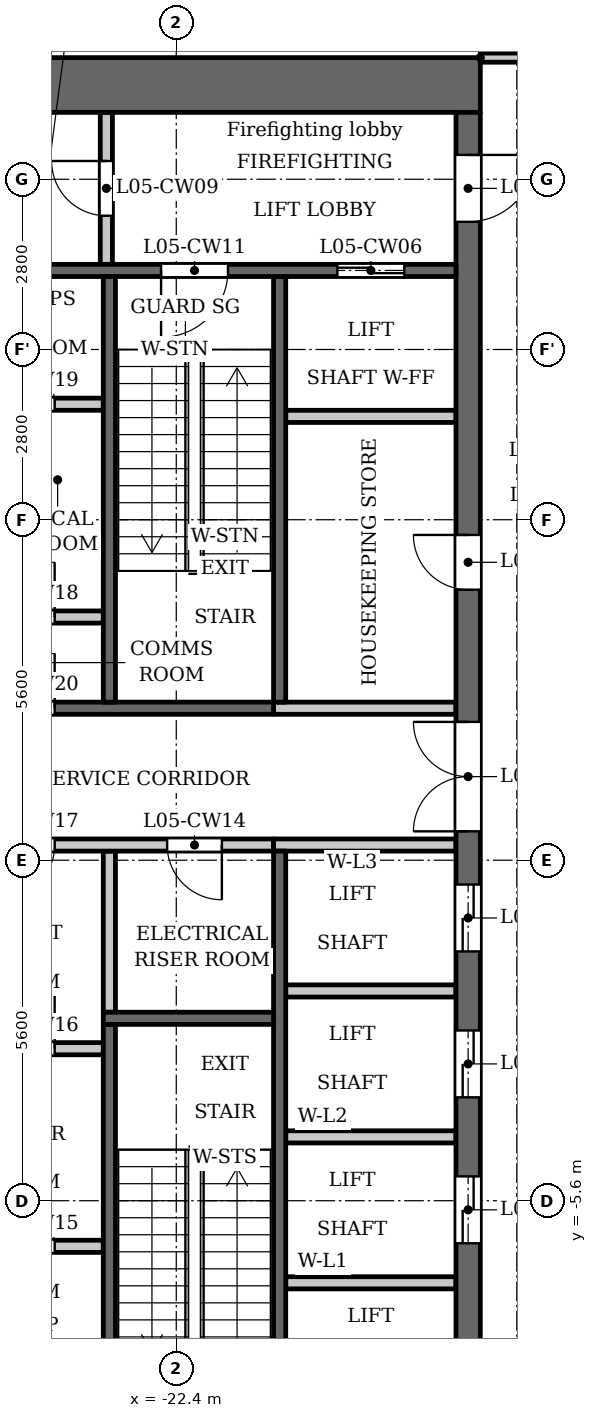
"""IFC4 building model, lengths in metres.
Left out: names, types, materials, properties, quantities, classifications, styles, units other than length and angle.
Written with IfcOpenShell. Run it as: python <this file> out.ifc"""

import sys

from ifc_helpers import new_model, si_unit, direction, frame, frame_2d, origin, place, context, subcontext, project, spatial, rectangle, extrude, element, fill, save


model = new_model("IFC4")
c1 = context("Model", 3, precision=1e-05, world=origin(), true_north=direction((0.0, 1.0)))
c2 = subcontext(c1, "Body", "Model", "MODEL_VIEW")
j1 = project(units=[si_unit("LENGTHUNIT", "METRE"), si_unit("PLANEANGLEUNIT", "RADIAN")], contexts=[c1])
p1 = place(None, origin())
s1 = spatial("IfcSite", under=j1, at=p1, CompositionType="ELEMENT")
p2 = place(p1, origin())
s2 = spatial("IfcBuilding", under=s1, at=p2, CompositionType="ELEMENT")
p3 = place(p2, frame((0.0, 0.0, 25.7)))
s3 = spatial("IfcBuildingStorey", under=s2, at=p3, CompositionType="ELEMENT", Elevation=25.7)
p4 = place(p3, frame((-23.5, -2.5, 0.0), z_axis=(0.0, 0.0, 1.0), x_axis=(0.0, 1.0, 0.0)))
e1 = element("IfcWall", 1, at=p4, inside=s3, PredefinedType="PARTITIONING", context=c2, shape_type="SweptSolid", body=[
    extrude(rectangle(XDim=2.65, YDim=0.2, at=frame_2d((1.325, 0.0))), origin(), (0.0, 0.0, 1.0), 4.45),
])
p5 = place(p3, frame((-20.7, 2.6, 0.0), z_axis=(0.0, 0.0, 1.0), x_axis=(0.0, 1.0, 0.0)))
e2 = element("IfcWall", 2, at=p5, inside=s3, PredefinedType="SHEAR", context=c2, shape_type="SweptSolid", body=[
    extrude(rectangle(XDim=7.0, YDim=0.2, at=frame_2d((3.5, 0.0))), origin(), (0.0, 0.0, 1.0), 4.45),
])
p6 = place(p3, frame((-20.7, -9.6, 0.0), z_axis=(0.0, 0.0, 1.0), x_axis=(0.0, 1.0, 0.0)))
e3 = element("IfcWall", 3, at=p6, inside=s3, PredefinedType="SHEAR", context=c2, shape_type="SweptSolid", body=[
    extrude(rectangle(XDim=9.75, YDim=0.2, at=frame_2d((4.875, 0.0))), origin(), (0.0, 0.0, 1.0), 4.45),
])
p7 = place(p3, frame((-20.8, 2.5, 0.0), z_axis=(0.0, 0.0, 1.0), x_axis=(-1.0, 0.0, 0.0)))
e4 = element("IfcWall", 4, at=p7, inside=s3, PredefinedType="SHEAR", context=c2, shape_type="SweptSolid", body=[
    extrude(rectangle(XDim=5.3, YDim=0.2, at=frame_2d((2.65, 0.0))), origin(), (0.0, 0.0, 1.0), 4.45),
])
p8 = place(p7, frame((3.6, 0.0, 0.0)))
e5 = element("IfcOpeningElement", 5, at=p8, cuts=e4, PredefinedType="OPENING", context=c2, shape_type="SweptSolid", body=[
    extrude(rectangle(XDim=0.9, YDim=2.1, at=frame_2d((0.45, 1.05))), frame((0.0, 0.11, 0.0), z_axis=(0.0, -1.0, 0.0), x_axis=(1.0, 0.0, 0.0)), (0.0, 0.0, 1.0), 0.22),
])
p9 = place(p3, frame((-20.8, 0.25, 0.0), z_axis=(0.0, 0.0, 1.0), x_axis=(-1.0, 0.0, 0.0)))
e6 = element("IfcWall", 6, at=p9, inside=s3, PredefinedType="PARTITIONING", context=c2, shape_type="SweptSolid", body=[
    extrude(rectangle(XDim=5.3, YDim=0.2, at=frame_2d((2.65, 0.0))), origin(), (0.0, 0.0, 1.0), 4.45),
])
p10 = place(p9, frame((0.85, 0.0, 0.0)))
e7 = element("IfcOpeningElement", 7, at=p10, cuts=e6, PredefinedType="OPENING", context=c2, shape_type="SweptSolid", body=[
    extrude(rectangle(XDim=0.9, YDim=2.1, at=frame_2d((0.45, 1.05))), frame((0.0, 0.11, 0.0), z_axis=(0.0, -1.0, 0.0), x_axis=(1.0, 0.0, 0.0)), (0.0, 0.0, 1.0), 0.22),
])
p11 = place(p9, frame((3.6, 0.0, 0.0)))
e8 = element("IfcOpeningElement", 8, at=p11, cuts=e6, PredefinedType="OPENING", context=c2, shape_type="SweptSolid", body=[
    extrude(rectangle(XDim=0.9, YDim=2.1, at=frame_2d((0.45, 1.05))), frame((0.0, 0.11, 0.0), z_axis=(0.0, -1.0, 0.0), x_axis=(1.0, 0.0, 0.0)), (0.0, 0.0, 1.0), 0.22),
])
p12 = place(p3, frame((-17.4, 12.75, 0.0), z_axis=(0.0, 0.0, 1.0), x_axis=(-1.0, 0.0, 0.0)))
e9 = element("IfcWall", 9, at=p12, inside=s3, PredefinedType="SHEAR", context=c2, shape_type="SweptSolid", body=[
    extrude(rectangle(XDim=10.4, YDim=0.9, at=frame_2d((5.2, 0.0))), origin(), (0.0, 0.0, 1.0), 4.45),
])
p13 = place(p3, frame((-17.6, -12.3, 0.0), z_axis=(0.0, 0.0, 1.0), x_axis=(0.0, 1.0, 0.0)))
e10 = element("IfcWall", 10, at=p13, inside=s3, PredefinedType="SHEAR", context=c2, shape_type="SweptSolid", body=[
    extrude(rectangle(XDim=24.6, YDim=0.4, at=frame_2d((12.3, 0.0))), origin(), (0.0, 0.0, 1.0), 4.45),
])
p14 = place(p13, frame((6.0, 0.0, 0.0)))
e11 = element("IfcOpeningElement", 11, at=p14, cuts=e10, PredefinedType="OPENING", context=c2, shape_type="SweptSolid", body=[
    extrude(rectangle(XDim=1.1, YDim=2.1, at=frame_2d((0.55, 1.05))), frame((0.0, 0.21, 0.0), z_axis=(0.0, -1.0, 0.0), x_axis=(1.0, 0.0, 0.0)), (0.0, 0.0, 1.0), 0.42),
])
p15 = place(p13, frame((8.4, 0.0, 0.0)))
e12 = element("IfcOpeningElement", 12, at=p15, cuts=e10, PredefinedType="OPENING", context=c2, shape_type="SweptSolid", body=[
    extrude(rectangle(XDim=1.1, YDim=2.1, at=frame_2d((0.55, 1.05))), frame((0.0, 0.21, 0.0), z_axis=(0.0, -1.0, 0.0), x_axis=(1.0, 0.0, 0.0)), (0.0, 0.0, 1.0), 0.42),
])
p16 = place(p13, frame((10.8, 0.0, 0.0)))
e13 = element("IfcOpeningElement", 13, at=p16, cuts=e10, PredefinedType="OPENING", context=c2, shape_type="SweptSolid", body=[
    extrude(rectangle(XDim=1.1, YDim=2.1, at=frame_2d((0.55, 1.05))), frame((0.0, 0.21, 0.0), z_axis=(0.0, -1.0, 0.0), x_axis=(1.0, 0.0, 0.0)), (0.0, 0.0, 1.0), 0.42),
])
p17 = place(p13, frame((16.75, 0.0, 0.0)))
e14 = element("IfcOpeningElement", 14, at=p17, cuts=e10, PredefinedType="OPENING", context=c2, shape_type="SweptSolid", body=[
    extrude(rectangle(XDim=0.9, YDim=2.1, at=frame_2d((0.45, 1.05))), frame((0.0, 0.21, 0.0), z_axis=(0.0, -1.0, 0.0), x_axis=(1.0, 0.0, 0.0)), (0.0, 0.0, 1.0), 0.42),
])
p18 = place(p13, frame((22.8, 0.0, 0.0)))
e15 = element("IfcOpeningElement", 15, at=p18, cuts=e10, PredefinedType="OPENING", context=c2, shape_type="SweptSolid", body=[
    extrude(rectangle(XDim=1.1, YDim=2.1, at=frame_2d((0.55, 1.05))), frame((0.0, 0.21, 0.0), z_axis=(0.0, -1.0, 0.0), x_axis=(1.0, 0.0, 0.0)), (0.0, 0.0, 1.0), 0.42),
])
p19 = place(p13, frame((0.7, 0.0, 0.0)))
e16 = element("IfcOpeningElement", 16, at=p19, cuts=e10, PredefinedType="OPENING", context=c2, shape_type="SweptSolid", body=[
    extrude(rectangle(XDim=1.1, YDim=2.1, at=frame_2d((0.55, 1.05))), frame((0.0, 0.21, 0.0), z_axis=(0.0, -1.0, 0.0), x_axis=(1.0, 0.0, 0.0)), (0.0, 0.0, 1.0), 0.42),
])
p20 = place(p13, frame((12.775, 0.0, 0.0)))
e17 = element("IfcOpeningElement", 17, at=p20, cuts=e10, PredefinedType="OPENING", context=c2, shape_type="SweptSolid", body=[
    extrude(rectangle(XDim=1.8, YDim=2.1, at=frame_2d((0.9, 1.05))), frame((0.0, 0.21, 0.0), z_axis=(0.0, -1.0, 0.0), x_axis=(1.0, 0.0, 0.0)), (0.0, 0.0, 1.0), 0.42),
])
p21 = place(p3, frame((-23.55, 9.8, 0.0), z_axis=(0.0, 0.0, 1.0), x_axis=(0.0, 1.0, 0.0)))
e18 = element("IfcWall", 18, at=p21, inside=s3, PredefinedType="PARTITIONING", context=c2, shape_type="SweptSolid", body=[
    extrude(rectangle(XDim=2.5, YDim=0.2, at=frame_2d((1.25, 0.0))), origin(), (0.0, 0.0, 1.0), 4.45),
])
p22 = place(p21, frame((0.8, 0.0, 0.0)))
e19 = element("IfcOpeningElement", 19, at=p22, cuts=e18, PredefinedType="OPENING", context=c2, shape_type="SweptSolid", body=[
    extrude(rectangle(XDim=0.9, YDim=2.1, at=frame_2d((0.45, 1.05))), frame((0.0, 0.11, 0.0), z_axis=(0.0, -1.0, 0.0), x_axis=(1.0, 0.0, 0.0)), (0.0, 0.0, 1.0), 0.22),
])
p23 = place(p3, frame((-23.6, -6.35, 0.0), z_axis=(0.0, 0.0, 1.0), x_axis=(-1.0, 0.0, 0.0)))
e20 = element("IfcWall", 20, at=p23, inside=s3, PredefinedType="PARTITIONING", context=c2, shape_type="SweptSolid", body=[
    extrude(rectangle(XDim=2.5, YDim=0.2, at=frame_2d((1.25, 0.0))), origin(), (0.0, 0.0, 1.0), 4.45),
])
p24 = place(p23, frame((0.8, 0.0, 0.0)))
e21 = element("IfcOpeningElement", 21, at=p24, cuts=e20, PredefinedType="OPENING", context=c2, shape_type="SweptSolid", body=[
    extrude(rectangle(XDim=0.9, YDim=2.1, at=frame_2d((0.45, 1.05))), frame((0.0, 0.11, 0.0), z_axis=(0.0, -1.0, 0.0), x_axis=(1.0, 0.0, 0.0)), (0.0, 0.0, 1.0), 0.22),
])
p25 = place(p3, frame((-23.6, -3.1, 0.0), z_axis=(0.0, 0.0, 1.0), x_axis=(-1.0, 0.0, 0.0)))
e22 = element("IfcWall", 22, at=p25, inside=s3, PredefinedType="PARTITIONING", context=c2, shape_type="SweptSolid", body=[
    extrude(rectangle(XDim=2.5, YDim=0.2, at=frame_2d((1.25, 0.0))), origin(), (0.0, 0.0, 1.0), 4.45),
])
p26 = place(p25, frame((0.8, 0.0, 0.0)))
e23 = element("IfcOpeningElement", 23, at=p26, cuts=e22, PredefinedType="OPENING", context=c2, shape_type="SweptSolid", body=[
    extrude(rectangle(XDim=0.9, YDim=2.1, at=frame_2d((0.45, 1.05))), frame((0.0, 0.11, 0.0), z_axis=(0.0, -1.0, 0.0), x_axis=(1.0, 0.0, 0.0)), (0.0, 0.0, 1.0), 0.22),
])
p27 = place(p3, frame((-23.6, 4.0, 0.0), z_axis=(0.0, 0.0, 1.0), x_axis=(-1.0, 0.0, 0.0)))
e24 = element("IfcWall", 24, at=p27, inside=s3, PredefinedType="PARTITIONING", context=c2, shape_type="SweptSolid", body=[
    extrude(rectangle(XDim=2.5, YDim=0.2, at=frame_2d((1.25, 0.0))), origin(), (0.0, 0.0, 1.0), 4.45),
])
p28 = place(p27, frame((0.8, 0.0, 0.0)))
e25 = element("IfcOpeningElement", 25, at=p28, cuts=e24, PredefinedType="OPENING", context=c2, shape_type="SweptSolid", body=[
    extrude(rectangle(XDim=0.9, YDim=2.1, at=frame_2d((0.45, 1.05))), frame((0.0, 0.11, 0.0), z_axis=(0.0, -1.0, 0.0), x_axis=(1.0, 0.0, 0.0)), (0.0, 0.0, 1.0), 0.22),
])
p29 = place(p3, frame((-23.6, 7.5, 0.0), z_axis=(0.0, 0.0, 1.0), x_axis=(-1.0, 0.0, 0.0)))
e26 = element("IfcWall", 26, at=p29, inside=s3, PredefinedType="PARTITIONING", context=c2, shape_type="SweptSolid", body=[
    extrude(rectangle(XDim=2.5, YDim=0.2, at=frame_2d((1.25, 0.0))), origin(), (0.0, 0.0, 1.0), 4.45),
])
p30 = place(p29, frame((0.8, 0.0, 0.0)))
e27 = element("IfcOpeningElement", 27, at=p30, cuts=e26, PredefinedType="OPENING", context=c2, shape_type="SweptSolid", body=[
    extrude(rectangle(XDim=0.9, YDim=2.1, at=frame_2d((0.45, 1.05))), frame((0.0, 0.11, 0.0), z_axis=(0.0, -1.0, 0.0), x_axis=(1.0, 0.0, 0.0)), (0.0, 0.0, 1.0), 0.22),
])
for number, where, z_axis, x_axis in (
    (28, (-17.8, -6.95, 0.0), (0.0, 0.0, 1.0), (-1.0, 0.0, 0.0)),
    (29, (-17.8, -4.55, 0.0), (0.0, 0.0, 1.0), (-1.0, 0.0, 0.0)),
    (30, (-17.8, -2.15, 0.0), (0.0, 0.0, 1.0), (-1.0, 0.0, 0.0)),
):
    element("IfcWall", number, at=place(p3, frame(where, z_axis=z_axis, x_axis=x_axis)), inside=s3, PredefinedType="PARTITIONING", context=c2, shape_type="SweptSolid", body=[
        extrude(rectangle(XDim=2.8, YDim=0.2, at=frame_2d((1.4, 0.0))), origin(), (0.0, 0.0, 1.0), 4.45),
    ])
for number, where, z_axis, x_axis in (
    (31, (-17.8, 0.25, 0.0), (0.0, 0.0, 1.0), (-1.0, 0.0, 0.0)),
    (32, (-17.8, 2.5, 0.0), (0.0, 0.0, 1.0), (-1.0, 0.0, 0.0)),
):
    element("IfcWall", number, at=place(p3, frame(where, z_axis=z_axis, x_axis=x_axis)), inside=s3, PredefinedType="PARTITIONING", context=c2, shape_type="SweptSolid", body=[
        extrude(rectangle(XDim=3.0, YDim=0.2, at=frame_2d((1.5, 0.0))), origin(), (0.0, 0.0, 1.0), 4.45),
    ])
p31 = place(p3, frame((-17.8, 7.3, 0.0), z_axis=(0.0, 0.0, 1.0), x_axis=(-1.0, 0.0, 0.0)))
e33 = element("IfcWall", 33, at=p31, inside=s3, PredefinedType="PARTITIONING", context=c2, shape_type="SweptSolid", body=[
    extrude(rectangle(XDim=2.8, YDim=0.2, at=frame_2d((1.4, 0.0))), origin(), (0.0, 0.0, 1.0), 4.45),
])
p32 = place(p3, frame((-17.8, 9.7, 0.0), z_axis=(0.0, 0.0, 1.0), x_axis=(-1.0, 0.0, 0.0)))
e34 = element("IfcWall", 34, at=p32, inside=s3, PredefinedType="SHEAR", context=c2, shape_type="SweptSolid", body=[
    extrude(rectangle(XDim=8.3, YDim=0.2, at=frame_2d((4.15, 0.0))), origin(), (0.0, 0.0, 1.0), 4.45),
])
p33 = place(p32, frame((0.85, 0.0, 0.0)))
e35 = element("IfcOpeningElement", 35, at=p33, cuts=e34, PredefinedType="OPENING", context=c2, shape_type="SweptSolid", body=[
    extrude(rectangle(XDim=1.1, YDim=2.1, at=frame_2d((0.55, 1.05))), frame((0.0, 0.11, 0.0), z_axis=(0.0, -1.0, 0.0), x_axis=(1.0, 0.0, 0.0)), (0.0, 0.0, 1.0), 0.22),
])
p34 = place(p32, frame((3.75, 0.0, 0.0)))
e36 = element("IfcOpeningElement", 36, at=p34, cuts=e34, PredefinedType="OPENING", context=c2, shape_type="SweptSolid", body=[
    extrude(rectangle(XDim=1.1, YDim=2.1, at=frame_2d((0.55, 1.05))), frame((0.0, 0.11, 0.0), z_axis=(0.0, -1.0, 0.0), x_axis=(1.0, 0.0, 0.0)), (0.0, 0.0, 1.0), 0.22),
])
p35 = place(p3, frame((-23.5, 2.6, 0.0), z_axis=(0.0, 0.0, 1.0), x_axis=(0.0, 1.0, 0.0)))
e37 = element("IfcWall", 37, at=p35, inside=s3, PredefinedType="SHEAR", context=c2, shape_type="SweptSolid", body=[
    extrude(rectangle(XDim=7.0, YDim=0.2, at=frame_2d((3.5, 0.0))), origin(), (0.0, 0.0, 1.0), 4.45),
])
p36 = place(p3, frame((-23.5, -9.6, 0.0), z_axis=(0.0, 0.0, 1.0), x_axis=(0.0, 1.0, 0.0)))
e38 = element("IfcWall", 38, at=p36, inside=s3, PredefinedType="SHEAR", context=c2, shape_type="SweptSolid", body=[
    extrude(rectangle(XDim=6.9, YDim=0.2, at=frame_2d((3.45, 0.0))), origin(), (0.0, 0.0, 1.0), 4.45),
])
p37 = place(p3, frame((-20.8, -2.6, 0.0), z_axis=(0.0, 0.0, 1.0), x_axis=(-1.0, 0.0, 0.0)))
e39 = element("IfcWall", 39, at=p37, inside=s3, PredefinedType="SHEAR", context=c2, shape_type="SweptSolid", body=[
    extrude(rectangle(XDim=2.8, YDim=0.2, at=frame_2d((1.4, 0.0))), origin(), (0.0, 0.0, 1.0), 4.45),
])
p38 = place(p3, frame((-17.4, 13.2, 0.0), z_axis=(0.0, 0.0, 1.0), x_axis=(1.0, 0.0, 0.0)))
e40 = element("IfcWall", 40, at=p38, inside=s3, PredefinedType="PARTITIONING", context=c2, shape_type="SweptSolid", body=[
    extrude(rectangle(XDim=34.8, YDim=0.15, at=frame_2d((17.4, 0.0))), origin(), (0.0, 0.0, 1.0), 4.45),
])
p39 = place(p38, frame((3.05, 0.0, 0.0)))
e41 = element("IfcOpeningElement", 41, at=p39, cuts=e40, PredefinedType="OPENING", context=c2, shape_type="SweptSolid", body=[
    extrude(rectangle(XDim=1.8, YDim=2.1, at=frame_2d((0.9, 1.05))), frame((0.0, 0.085, 0.0), z_axis=(0.0, -1.0, 0.0), x_axis=(1.0, 0.0, 0.0)), (0.0, 0.0, 1.0), 0.17),
])
p40 = place(p38, frame((0.75, 0.0, 0.0)))
e42 = element("IfcOpeningElement", 42, at=p40, cuts=e40, PredefinedType="OPENING", context=c2, shape_type="SweptSolid", body=[
    extrude(rectangle(XDim=1.0, YDim=2.1, at=frame_2d((0.5, 1.05))), frame((0.0, 0.085, 0.0), z_axis=(0.0, -1.0, 0.0), x_axis=(1.0, 0.0, 0.0)), (0.0, 0.0, 1.0), 0.17),
])
p41 = place(p38, frame((33.15, 0.0, 0.0)))
e43 = element("IfcOpeningElement", 43, at=p41, cuts=e40, PredefinedType="OPENING", context=c2, shape_type="SweptSolid", body=[
    extrude(rectangle(XDim=1.0, YDim=2.1, at=frame_2d((0.5, 1.05))), frame((0.0, 0.085, 0.0), z_axis=(0.0, -1.0, 0.0), x_axis=(1.0, 0.0, 0.0)), (0.0, 0.0, 1.0), 0.17),
])
p42 = place(p14, origin())
e44 = element("IfcDoor", 44, at=p42, inside=s3, OperationType="DOUBLE_DOOR_SLIDING", PredefinedType="DOOR", context=c2, shape_type="SweptSolid", body=[
    extrude(rectangle(XDim=1.1, YDim=2.1, at=frame_2d((0.55, 1.05))), frame((0.0, 0.025, 0.0), z_axis=(0.0, -1.0, 0.0), x_axis=(1.0, 0.0, 0.0)), (0.0, 0.0, 1.0), 0.05),
])
fill(e11, e44)
p43 = place(p15, origin())
e45 = element("IfcDoor", 45, at=p43, inside=s3, OperationType="DOUBLE_DOOR_SLIDING", PredefinedType="DOOR", context=c2, shape_type="SweptSolid", body=[
    extrude(rectangle(XDim=1.1, YDim=2.1, at=frame_2d((0.55, 1.05))), frame((0.0, 0.025, 0.0), z_axis=(0.0, -1.0, 0.0), x_axis=(1.0, 0.0, 0.0)), (0.0, 0.0, 1.0), 0.05),
])
fill(e12, e45)
p44 = place(p16, origin())
e46 = element("IfcDoor", 46, at=p44, inside=s3, OperationType="DOUBLE_DOOR_SLIDING", PredefinedType="DOOR", context=c2, shape_type="SweptSolid", body=[
    extrude(rectangle(XDim=1.1, YDim=2.1, at=frame_2d((0.55, 1.05))), frame((0.0, 0.025, 0.0), z_axis=(0.0, -1.0, 0.0), x_axis=(1.0, 0.0, 0.0)), (0.0, 0.0, 1.0), 0.05),
])
fill(e13, e46)
p45 = place(p17, origin())
e47 = element("IfcDoor", 47, at=p45, inside=s3, OperationType="SINGLE_SWING_LEFT", PredefinedType="DOOR", context=c2, shape_type="SweptSolid", body=[
    extrude(rectangle(XDim=0.9, YDim=2.1, at=frame_2d((0.45, 1.05))), frame((0.0, 0.025, 0.0), z_axis=(0.0, -1.0, 0.0), x_axis=(1.0, 0.0, 0.0)), (0.0, 0.0, 1.0), 0.05),
])
fill(e14, e47)
p46 = place(p33, origin())
e48 = element("IfcDoor", 48, at=p46, inside=s3, OperationType="DOUBLE_DOOR_SLIDING", PredefinedType="DOOR", context=c2, shape_type="SweptSolid", body=[
    extrude(rectangle(XDim=1.1, YDim=2.1, at=frame_2d((0.55, 1.05))), frame((0.0, 0.025, 0.0), z_axis=(0.0, -1.0, 0.0), x_axis=(1.0, 0.0, 0.0)), (0.0, 0.0, 1.0), 0.05),
])
fill(e35, e48)
p47 = place(p18, origin())
e49 = element("IfcDoor", 49, at=p47, inside=s3, OperationType="SINGLE_SWING_RIGHT", PredefinedType="DOOR", context=c2, shape_type="SweptSolid", body=[
    extrude(rectangle(XDim=1.1, YDim=2.1, at=frame_2d((0.55, 1.05))), frame((0.0, 0.025, 0.0), z_axis=(0.0, -1.0, 0.0), x_axis=(1.0, 0.0, 0.0)), (0.0, 0.0, 1.0), 0.05),
])
fill(e15, e49)
p48 = place(p22, origin())
e50 = element("IfcDoor", 50, at=p48, inside=s3, OperationType="SINGLE_SWING_LEFT", PredefinedType="DOOR", context=c2, shape_type="SweptSolid", body=[
    extrude(rectangle(XDim=0.9, YDim=2.1, at=frame_2d((0.45, 1.05))), frame((0.0, 0.025, 0.0), z_axis=(0.0, -1.0, 0.0), x_axis=(1.0, 0.0, 0.0)), (0.0, 0.0, 1.0), 0.05),
])
fill(e19, e50)
p49 = place(p34, origin())
e51 = element("IfcDoor", 51, at=p49, inside=s3, OperationType="SINGLE_SWING_LEFT", PredefinedType="DOOR", context=c2, shape_type="SweptSolid", body=[
    extrude(rectangle(XDim=1.1, YDim=2.1, at=frame_2d((0.55, 1.05))), frame((0.0, 0.025, 0.0), z_axis=(0.0, -1.0, 0.0), x_axis=(1.0, 0.0, 0.0)), (0.0, 0.0, 1.0), 0.05),
])
fill(e36, e51)
p50 = place(p20, origin())
e52 = element("IfcDoor", 52, at=p50, inside=s3, OperationType="DOUBLE_DOOR_SINGLE_SWING", PredefinedType="DOOR", context=c2, shape_type="SweptSolid", body=[
    extrude(rectangle(XDim=1.8, YDim=2.1, at=frame_2d((0.9, 1.05))), frame((0.0, 0.025, 0.0), z_axis=(0.0, -1.0, 0.0), x_axis=(1.0, 0.0, 0.0)), (0.0, 0.0, 1.0), 0.05),
])
fill(e17, e52)
p51 = place(p10, origin())
e53 = element("IfcDoor", 53, at=p51, inside=s3, OperationType="SINGLE_SWING_RIGHT", PredefinedType="DOOR", context=c2, shape_type="SweptSolid", body=[
    extrude(rectangle(XDim=0.9, YDim=2.1, at=frame_2d((0.45, 1.05))), frame((0.0, 0.025, 0.0), z_axis=(0.0, -1.0, 0.0), x_axis=(1.0, 0.0, 0.0)), (0.0, 0.0, 1.0), 0.05),
])
fill(e7, e53)
p52 = place(p24, origin())
e54 = element("IfcDoor", 54, at=p52, inside=s3, OperationType="SINGLE_SWING_RIGHT", PredefinedType="DOOR", context=c2, shape_type="SweptSolid", body=[
    extrude(rectangle(XDim=0.9, YDim=2.1, at=frame_2d((0.45, 1.05))), frame((0.0, 0.025, 0.0), z_axis=(0.0, -1.0, 0.0), x_axis=(1.0, 0.0, 0.0)), (0.0, 0.0, 1.0), 0.05),
])
fill(e21, e54)
p53 = place(p26, origin())
e55 = element("IfcDoor", 55, at=p53, inside=s3, OperationType="SINGLE_SWING_LEFT", PredefinedType="DOOR", context=c2, shape_type="SweptSolid", body=[
    extrude(rectangle(XDim=0.9, YDim=2.1, at=frame_2d((0.45, 1.05))), frame((0.0, 0.025, 0.0), z_axis=(0.0, -1.0, 0.0), x_axis=(1.0, 0.0, 0.0)), (0.0, 0.0, 1.0), 0.05),
])
fill(e23, e55)
p54 = place(p11, origin())
e56 = element("IfcDoor", 56, at=p54, inside=s3, OperationType="SINGLE_SWING_LEFT", PredefinedType="DOOR", context=c2, shape_type="SweptSolid", body=[
    extrude(rectangle(XDim=0.9, YDim=2.1, at=frame_2d((0.45, 1.05))), frame((0.0, 0.025, 0.0), z_axis=(0.0, -1.0, 0.0), x_axis=(1.0, 0.0, 0.0)), (0.0, 0.0, 1.0), 0.05),
])
fill(e8, e56)
p55 = place(p28, origin())
e57 = element("IfcDoor", 57, at=p55, inside=s3, OperationType="SINGLE_SWING_LEFT", PredefinedType="DOOR", context=c2, shape_type="SweptSolid", body=[
    extrude(rectangle(XDim=0.9, YDim=2.1, at=frame_2d((0.45, 1.05))), frame((0.0, 0.025, 0.0), z_axis=(0.0, -1.0, 0.0), x_axis=(1.0, 0.0, 0.0)), (0.0, 0.0, 1.0), 0.05),
])
fill(e25, e57)
p56 = place(p30, origin())
e58 = element("IfcDoor", 58, at=p56, inside=s3, OperationType="SINGLE_SWING_RIGHT", PredefinedType="DOOR", context=c2, shape_type="SweptSolid", body=[
    extrude(rectangle(XDim=0.9, YDim=2.1, at=frame_2d((0.45, 1.05))), frame((0.0, 0.025, 0.0), z_axis=(0.0, -1.0, 0.0), x_axis=(1.0, 0.0, 0.0)), (0.0, 0.0, 1.0), 0.05),
])
fill(e27, e58)
p57 = place(p8, origin())
e59 = element("IfcDoor", 59, at=p57, inside=s3, OperationType="SINGLE_SWING_LEFT", PredefinedType="DOOR", context=c2, shape_type="SweptSolid", body=[
    extrude(rectangle(XDim=0.9, YDim=2.1, at=frame_2d((0.45, 1.05))), frame((0.0, 0.025, 0.0), z_axis=(0.0, -1.0, 0.0), x_axis=(1.0, 0.0, 0.0)), (0.0, 0.0, 1.0), 0.05),
])
fill(e5, e59)
save(model, sys.argv[1])
